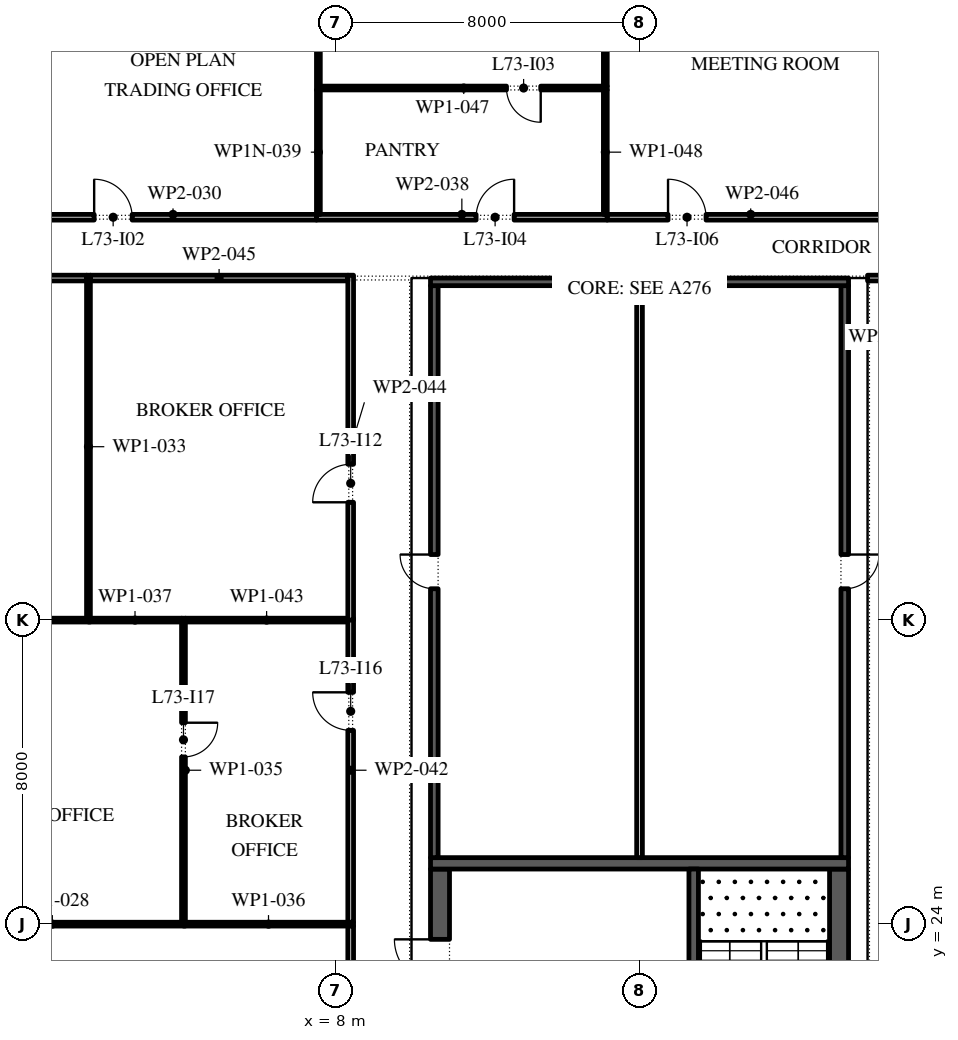
"""IFC4 building model, lengths in metres.
Left out: names, types, materials, properties, quantities, classifications, styles, units other than length and angle.
Written with IfcOpenShell. Run it as: python <this file> out.ifc"""

import sys

from ifc_helpers import new_model, si_unit, direction, frame, frame_2d, origin, place, context, subcontext, project, spatial, rectangle, extrude, element, fill, save


model = new_model("IFC4")
c1 = context("Model", 3, precision=1e-05, world=origin(), true_north=direction((0.0, 1.0)))
c2 = subcontext(c1, "Body", "Model", "MODEL_VIEW")
j1 = project(units=[si_unit("LENGTHUNIT", "METRE"), si_unit("PLANEANGLEUNIT", "RADIAN")], contexts=[c1])
p1 = place(None, origin())
s1 = spatial("IfcSite", under=j1, at=p1, CompositionType="ELEMENT")
p2 = place(p1, origin())
s2 = spatial("IfcBuilding", under=s1, at=p2, CompositionType="ELEMENT")
p3 = place(p2, frame((0.0, 0.0, 334.2)))
s3 = spatial("IfcBuildingStorey", under=s2, at=p3, CompositionType="ELEMENT", Elevation=334.2)
p4 = place(p3, frame((21.25, -2.45, 0.0), z_axis=(0.0, 0.0, 1.0), x_axis=(0.0, 1.0, 0.0)))
e1 = element("IfcWall", 1, at=p4, inside=s3, PredefinedType="SHEAR", context=c2, shape_type="SweptSolid", body=[
    extrude(rectangle(XDim=27.9, YDim=0.5, at=frame_2d((13.95, 0.0))), origin(), (0.0, 0.0, 1.0), 4.0),
])
p5 = place(p4, frame((5.05, 0.0, 0.0)))
e2 = element("IfcOpeningElement", 2, at=p5, cuts=e1, PredefinedType="OPENING", context=c2, shape_type="SweptSolid", body=[
    extrude(rectangle(XDim=1.2, YDim=2.1, at=frame_2d((0.6, 1.05))), frame((0.0, 0.26, 0.0), z_axis=(0.0, -1.0, 0.0), x_axis=(1.0, 0.0, 0.0)), (0.0, 0.0, 1.0), 0.52),
])
p6 = place(p4, frame((21.65, 0.0, 0.0)))
e3 = element("IfcOpeningElement", 3, at=p6, cuts=e1, PredefinedType="OPENING", context=c2, shape_type="SweptSolid", body=[
    extrude(rectangle(XDim=1.2, YDim=2.1, at=frame_2d((0.6, 1.05))), frame((0.0, 0.26, 0.0), z_axis=(0.0, -1.0, 0.0), x_axis=(1.0, 0.0, 0.0)), (0.0, 0.0, 1.0), 0.52),
])
p7 = place(p3, frame((10.75, -2.45, 0.0), z_axis=(0.0, 0.0, 1.0), x_axis=(0.0, 1.0, 0.0)))
e4 = element("IfcWall", 4, at=p7, inside=s3, PredefinedType="SHEAR", context=c2, shape_type="SweptSolid", body=[
    extrude(rectangle(XDim=27.9, YDim=0.5, at=frame_2d((13.95, 0.0))), origin(), (0.0, 0.0, 1.0), 4.0),
])
p8 = place(p7, frame((23.65, 0.0, 0.0)))
e5 = element("IfcOpeningElement", 5, at=p8, cuts=e4, PredefinedType="OPENING", context=c2, shape_type="SweptSolid", body=[
    extrude(rectangle(XDim=2.4, YDim=2.1, at=frame_2d((1.2, 1.05))), frame((0.0, 0.26, 0.0), z_axis=(0.0, -1.0, 0.0), x_axis=(1.0, 0.0, 0.0)), (0.0, 0.0, 1.0), 0.52),
])
p9 = place(p7, frame((1.387, 0.0, 0.0)))
e6 = element("IfcOpeningElement", 6, at=p9, cuts=e4, PredefinedType="OPENING", context=c2, shape_type="SweptSolid", body=[
    extrude(rectangle(XDim=0.9, YDim=2.1, at=frame_2d((0.45, 1.05))), frame((0.0, 0.26, 0.0), z_axis=(0.0, -1.0, 0.0), x_axis=(1.0, 0.0, 0.0)), (0.0, 0.0, 1.0), 0.52),
])
p10 = place(p7, frame((4.562, 0.0, 0.0)))
e7 = element("IfcOpeningElement", 7, at=p10, cuts=e4, PredefinedType="OPENING", context=c2, shape_type="SweptSolid", body=[
    extrude(rectangle(XDim=1.0, YDim=2.1, at=frame_2d((0.5, 1.05))), frame((0.0, 0.26, 0.0), z_axis=(0.0, -1.0, 0.0), x_axis=(1.0, 0.0, 0.0)), (0.0, 0.0, 1.0), 0.52),
])
p11 = place(p3, frame((10.5, 25.6, 0.0), z_axis=(0.0, 0.0, 1.0), x_axis=(1.0, 0.0, 0.0)))
e8 = element("IfcWall", 8, at=p11, inside=s3, PredefinedType="SHEAR", context=c2, shape_type="SweptSolid", body=[
    extrude(rectangle(XDim=11.0, YDim=0.3, at=frame_2d((5.5, 0.0))), origin(), (0.0, 0.0, 1.0), 4.0),
])
p12 = place(p3, frame((17.425, 19.15, 0.0), z_axis=(0.0, 0.0, 1.0), x_axis=(0.0, 1.0, 0.0)))
e9 = element("IfcWall", 9, at=p12, inside=s3, PredefinedType="SHEAR", context=c2, shape_type="SweptSolid", body=[
    extrude(rectangle(XDim=6.3, YDim=0.25, at=frame_2d((3.15, 0.0))), origin(), (0.0, 0.0, 1.0), 4.0),
])
p13 = place(p12, frame((0.05, 0.0, 0.0)))
e10 = element("IfcOpeningElement", 10, at=p13, cuts=e9, PredefinedType="OPENING", context=c2, shape_type="SweptSolid", body=[
    extrude(rectangle(XDim=1.2, YDim=2.1, at=frame_2d((0.6, 1.05))), frame((0.0, 0.135, 0.0), z_axis=(0.0, -1.0, 0.0), x_axis=(1.0, 0.0, 0.0)), (0.0, 0.0, 1.0), 0.27),
])
p14 = place(p3, frame((21.4, 25.75, 0.0), z_axis=(0.0, 0.0, 1.0), x_axis=(0.0, 1.0, 0.0)))
e11 = element("IfcWall", 11, at=p14, inside=s3, PredefinedType="SHEAR", context=c2, shape_type="SweptSolid", body=[
    extrude(rectangle(XDim=15.05, YDim=0.2, at=frame_2d((7.525, 0.0))), origin(), (0.0, 0.0, 1.0), 4.0),
])
p15 = place(p14, frame((7.075, 0.0, 0.0)))
e12 = element("IfcOpeningElement", 12, at=p15, cuts=e11, PredefinedType="OPENING", context=c2, shape_type="SweptSolid", body=[
    extrude(rectangle(XDim=0.9, YDim=2.1, at=frame_2d((0.45, 1.05))), frame((0.0, 0.11, 0.0), z_axis=(0.0, -1.0, 0.0), x_axis=(1.0, 0.0, 0.0)), (0.0, 0.0, 1.0), 0.22),
])
p16 = place(p3, frame((10.6, 25.75, 0.0), z_axis=(0.0, 0.0, 1.0), x_axis=(0.0, 1.0, 0.0)))
e13 = element("IfcWall", 13, at=p16, inside=s3, PredefinedType="SHEAR", context=c2, shape_type="SweptSolid", body=[
    extrude(rectangle(XDim=15.05, YDim=0.2, at=frame_2d((7.525, 0.0))), origin(), (0.0, 0.0, 1.0), 4.0),
])
p17 = place(p16, frame((7.075, 0.0, 0.0)))
e14 = element("IfcOpeningElement", 14, at=p17, cuts=e13, PredefinedType="OPENING", context=c2, shape_type="SweptSolid", body=[
    extrude(rectangle(XDim=0.9, YDim=2.1, at=frame_2d((0.45, 1.05))), frame((0.0, 0.11, 0.0), z_axis=(0.0, -1.0, 0.0), x_axis=(1.0, 0.0, 0.0)), (0.0, 0.0, 1.0), 0.22),
])
p18 = place(p3, frame((10.5, 40.9, 0.0), z_axis=(0.0, 0.0, 1.0), x_axis=(1.0, 0.0, 0.0)))
e15 = element("IfcWall", 15, at=p18, inside=s3, PredefinedType="SHEAR", context=c2, shape_type="SweptSolid", body=[
    extrude(rectangle(XDim=11.0, YDim=0.2, at=frame_2d((5.5, 0.0))), origin(), (0.0, 0.0, 1.0), 4.0),
])
p19 = place(p3, frame((16.0, 25.75, 0.0), z_axis=(0.0, 0.0, 1.0), x_axis=(0.0, 1.0, 0.0)))
e16 = element("IfcWall", 16, at=p19, inside=s3, PredefinedType="PARTITIONING", context=c2, shape_type="SweptSolid", body=[
    extrude(rectangle(XDim=15.05, YDim=0.15, at=frame_2d((7.525, 0.0))), origin(), (0.0, 0.0, 1.0), 4.0),
])
p20 = place(p3, frame((-2.95, 24.0, 0.0), z_axis=(0.0, 0.0, 1.0), x_axis=(1.0, 0.0, 0.0)))
e17 = element("IfcWall", 17, at=p20, inside=s3, PredefinedType="PARTITIONING", context=c2, shape_type="SweptSolid", body=[
    extrude(rectangle(XDim=7.0, YDim=0.1, at=frame_2d((3.5, 0.0))), origin(), (0.0, 0.0, 1.0), 4.0),
])
p21 = place(p3, frame((-0.05, 42.6, 0.0), z_axis=(0.0, 0.0, 1.0), x_axis=(1.0, 0.0, 0.0)))
e18 = element("IfcWall", 18, at=p21, inside=s3, PredefinedType="PARTITIONING", context=c2, shape_type="SweptSolid", body=[
    extrude(rectangle(XDim=7.55, YDim=0.15, at=frame_2d((3.775, 0.0))), origin(), (0.0, 0.0, 1.0), 4.0),
])
p22 = place(p21, frame((1.7, 0.0, 0.0)))
e19 = element("IfcOpeningElement", 19, at=p22, cuts=e18, PredefinedType="OPENING", context=c2, shape_type="SweptSolid", body=[
    extrude(rectangle(XDim=1.0, YDim=2.1, at=frame_2d((0.5, 1.05))), frame((0.0, 0.085, 0.0), z_axis=(0.0, -1.0, 0.0), x_axis=(1.0, 0.0, 0.0)), (0.0, 0.0, 1.0), 0.17),
])
p23 = place(p3, frame((1.55, 32.0, 0.0), z_axis=(0.0, 0.0, 1.0), x_axis=(-1.0, 0.0, 0.0)))
e20 = element("IfcWall", 20, at=p23, inside=s3, PredefinedType="PARTITIONING", context=c2, shape_type="SweptSolid", body=[
    extrude(rectangle(XDim=4.5, YDim=0.1, at=frame_2d((2.25, 0.0))), origin(), (0.0, 0.0, 1.0), 4.0),
])
p24 = place(p3, frame((1.5, 32.05, 0.0), z_axis=(0.0, 0.0, 1.0), x_axis=(0.0, 1.0, 0.0)))
e21 = element("IfcWall", 21, at=p24, inside=s3, PredefinedType="PARTITIONING", context=c2, shape_type="SweptSolid", body=[
    extrude(rectangle(XDim=9.025, YDim=0.1, at=frame_2d((4.512, 0.0))), origin(), (0.0, 0.0, 1.0), 4.0),
])
p25 = place(p3, frame((1.45, 41.0, 0.0), z_axis=(0.0, 0.0, 1.0), x_axis=(-1.0, 0.0, 0.0)))
e22 = element("IfcWall", 22, at=p25, inside=s3, PredefinedType="PARTITIONING", context=c2, shape_type="SweptSolid", body=[
    extrude(rectangle(XDim=5.9, YDim=0.15, at=frame_2d((2.95, 0.0))), origin(), (0.0, 0.0, 1.0), 4.0),
])
p26 = place(p25, frame((1.3, 0.0, 0.0)))
e23 = element("IfcOpeningElement", 23, at=p26, cuts=e22, PredefinedType="OPENING", context=c2, shape_type="SweptSolid", body=[
    extrude(rectangle(XDim=1.0, YDim=2.1, at=frame_2d((0.5, 1.05))), frame((0.0, 0.085, 0.0), z_axis=(0.0, -1.0, 0.0), x_axis=(1.0, 0.0, 0.0)), (0.0, 0.0, 1.0), 0.17),
])
p27 = place(p3, frame((4.0, 24.05, 0.0), z_axis=(0.0, 0.0, 1.0), x_axis=(0.0, 1.0, 0.0)))
e24 = element("IfcWall", 24, at=p27, inside=s3, PredefinedType="PARTITIONING", context=c2, shape_type="SweptSolid", body=[
    extrude(rectangle(XDim=8.0, YDim=0.1, at=frame_2d((4.0, 0.0))), origin(), (0.0, 0.0, 1.0), 4.0),
])
p28 = place(p27, frame((4.35, 0.0, 0.0)))
e25 = element("IfcOpeningElement", 25, at=p28, cuts=e24, PredefinedType="OPENING", context=c2, shape_type="SweptSolid", body=[
    extrude(rectangle(XDim=0.9, YDim=2.1, at=frame_2d((0.45, 1.05))), frame((0.0, 0.06, 0.0), z_axis=(0.0, -1.0, 0.0), x_axis=(1.0, 0.0, 0.0)), (0.0, 0.0, 1.0), 0.12),
])
p29 = place(p3, frame((4.0, 24.0, 0.0), z_axis=(0.0, 0.0, 1.0), x_axis=(1.0, 0.0, 0.0)))
e26 = element("IfcWall", 26, at=p29, inside=s3, PredefinedType="PARTITIONING", context=c2, shape_type="SweptSolid", body=[
    extrude(rectangle(XDim=4.475, YDim=0.1, at=frame_2d((2.238, 0.0))), origin(), (0.0, 0.0, 1.0), 4.0),
])
p30 = place(p3, frame((3.95, 32.0, 0.0), z_axis=(0.0, 0.0, 1.0), x_axis=(-1.0, 0.0, 0.0)))
e27 = element("IfcWall", 27, at=p30, inside=s3, PredefinedType="PARTITIONING", context=c2, shape_type="SweptSolid", body=[
    extrude(rectangle(XDim=2.45, YDim=0.1, at=frame_2d((1.225, 0.0))), origin(), (0.0, 0.0, 1.0), 4.0),
])
p31 = place(p3, frame((7.5, 42.6, 0.0), z_axis=(0.0, 0.0, 1.0), x_axis=(1.0, 0.0, 0.0)))
e28 = element("IfcWall", 28, at=p31, inside=s3, PredefinedType="PARTITIONING", context=c2, shape_type="SweptSolid", body=[
    extrude(rectangle(XDim=7.65, YDim=0.15, at=frame_2d((3.825, 0.0))), origin(), (0.0, 0.0, 1.0), 4.0),
])
p32 = place(p31, frame((4.2, 0.0, 0.0)))
e29 = element("IfcOpeningElement", 29, at=p32, cuts=e28, PredefinedType="OPENING", context=c2, shape_type="SweptSolid", body=[
    extrude(rectangle(XDim=1.0, YDim=2.1, at=frame_2d((0.5, 1.05))), frame((0.0, 0.085, 0.0), z_axis=(0.0, -1.0, 0.0), x_axis=(1.0, 0.0, 0.0)), (0.0, 0.0, 1.0), 0.17),
])
p33 = place(p3, frame((7.55, 45.95, 0.0), z_axis=(0.0, 0.0, 1.0), x_axis=(0.0, -1.0, 0.0)))
e30 = element("IfcWall", 30, at=p33, inside=s3, PredefinedType="PARTITIONING", context=c2, shape_type="SweptSolid", body=[
    extrude(rectangle(XDim=3.275, YDim=0.1, at=frame_2d((1.637, 0.0))), origin(), (0.0, 0.0, 1.0), 3.164),
])
p34 = place(p3, frame((7.55, 52.8, 0.0), z_axis=(0.0, 0.0, 1.0), x_axis=(0.0, -1.0, 0.0)))
e31 = element("IfcWall", 31, at=p34, inside=s3, PredefinedType="PARTITIONING", context=c2, shape_type="SweptSolid", body=[
    extrude(rectangle(XDim=6.85, YDim=0.1, at=frame_2d((3.425, 0.0))), origin(), (0.0, 0.0, 1.0), 3.164),
])
p35 = place(p3, frame((8.4, 19.075, 0.0), z_axis=(0.0, 0.0, 1.0), x_axis=(0.0, 1.0, 0.0)))
e32 = element("IfcWall", 32, at=p35, inside=s3, PredefinedType="PARTITIONING", context=c2, shape_type="SweptSolid", body=[
    extrude(rectangle(XDim=4.875, YDim=0.15, at=frame_2d((2.438, 0.0))), origin(), (0.0, 0.0, 1.0), 4.0),
])
p36 = place(p3, frame((8.4, 24.05, 0.0), z_axis=(0.0, 0.0, 1.0), x_axis=(0.0, 1.0, 0.0)))
e33 = element("IfcWall", 33, at=p36, inside=s3, PredefinedType="PARTITIONING", context=c2, shape_type="SweptSolid", body=[
    extrude(rectangle(XDim=8.0, YDim=0.15, at=frame_2d((4.0, 0.0))), origin(), (0.0, 0.0, 1.0), 4.0),
])
p37 = place(p36, frame((5.05, 0.0, 0.0)))
e34 = element("IfcOpeningElement", 34, at=p37, cuts=e33, PredefinedType="OPENING", context=c2, shape_type="SweptSolid", body=[
    extrude(rectangle(XDim=1.0, YDim=2.1, at=frame_2d((0.5, 1.05))), frame((0.0, 0.085, 0.0), z_axis=(0.0, -1.0, 0.0), x_axis=(1.0, 0.0, 0.0)), (0.0, 0.0, 1.0), 0.17),
])
p38 = place(p3, frame((8.325, 32.0, 0.0), z_axis=(0.0, 0.0, 1.0), x_axis=(-1.0, 0.0, 0.0)))
e35 = element("IfcWall", 35, at=p38, inside=s3, PredefinedType="PARTITIONING", context=c2, shape_type="SweptSolid", body=[
    extrude(rectangle(XDim=4.275, YDim=0.1, at=frame_2d((2.137, 0.0))), origin(), (0.0, 0.0, 1.0), 4.0),
])
p39 = place(p3, frame((8.4, 32.0, 0.0), z_axis=(0.0, 0.0, 1.0), x_axis=(0.0, 1.0, 0.0)))
e36 = element("IfcWall", 36, at=p39, inside=s3, PredefinedType="PARTITIONING", context=c2, shape_type="SweptSolid", body=[
    extrude(rectangle(XDim=9.075, YDim=0.15, at=frame_2d((4.538, 0.0))), origin(), (0.0, 0.0, 1.0), 4.0),
])
p40 = place(p39, frame((3.1, 0.0, 0.0)))
e37 = element("IfcOpeningElement", 37, at=p40, cuts=e36, PredefinedType="OPENING", context=c2, shape_type="SweptSolid", body=[
    extrude(rectangle(XDim=1.0, YDim=2.1, at=frame_2d((0.5, 1.05))), frame((0.0, 0.085, 0.0), z_axis=(0.0, -1.0, 0.0), x_axis=(1.0, 0.0, 0.0)), (0.0, 0.0, 1.0), 0.17),
])
p41 = place(p3, frame((8.325, 41.0, 0.0), z_axis=(0.0, 0.0, 1.0), x_axis=(-1.0, 0.0, 0.0)))
e38 = element("IfcWall", 38, at=p41, inside=s3, PredefinedType="PARTITIONING", context=c2, shape_type="SweptSolid", body=[
    extrude(rectangle(XDim=6.775, YDim=0.15, at=frame_2d((3.387, 0.0))), origin(), (0.0, 0.0, 1.0), 4.0),
])
p42 = place(p3, frame((15.15, 42.6, 0.0), z_axis=(0.0, 0.0, 1.0), x_axis=(1.0, 0.0, 0.0)))
e39 = element("IfcWall", 39, at=p42, inside=s3, PredefinedType="PARTITIONING", context=c2, shape_type="SweptSolid", body=[
    extrude(rectangle(XDim=7.55, YDim=0.15, at=frame_2d((3.775, 0.0))), origin(), (0.0, 0.0, 1.0), 4.0),
])
p43 = place(p42, frame((1.6, 0.0, 0.0)))
e40 = element("IfcOpeningElement", 40, at=p43, cuts=e39, PredefinedType="OPENING", context=c2, shape_type="SweptSolid", body=[
    extrude(rectangle(XDim=1.0, YDim=2.1, at=frame_2d((0.5, 1.05))), frame((0.0, 0.085, 0.0), z_axis=(0.0, -1.0, 0.0), x_axis=(1.0, 0.0, 0.0)), (0.0, 0.0, 1.0), 0.17),
])
p44 = place(p3, frame((15.15, 46.0, 0.0), z_axis=(0.0, 0.0, 1.0), x_axis=(-1.0, 0.0, 0.0)))
e41 = element("IfcWall", 41, at=p44, inside=s3, PredefinedType="PARTITIONING", context=c2, shape_type="SweptSolid", body=[
    extrude(rectangle(XDim=7.55, YDim=0.1, at=frame_2d((3.775, 0.0))), origin(), (0.0, 0.0, 1.0), 4.0),
])
p45 = place(p44, frame((1.75, 0.0, 0.0)))
e42 = element("IfcOpeningElement", 42, at=p45, cuts=e41, PredefinedType="OPENING", context=c2, shape_type="SweptSolid", body=[
    extrude(rectangle(XDim=0.9, YDim=2.1, at=frame_2d((0.45, 1.05))), frame((0.0, 0.06, 0.0), z_axis=(0.0, -1.0, 0.0), x_axis=(1.0, 0.0, 0.0)), (0.0, 0.0, 1.0), 0.12),
])
p46 = place(p3, frame((15.1, 45.95, 0.0), z_axis=(0.0, 0.0, 1.0), x_axis=(0.0, -1.0, 0.0)))
e43 = element("IfcWall", 43, at=p46, inside=s3, PredefinedType="PARTITIONING", context=c2, shape_type="SweptSolid", body=[
    extrude(rectangle(XDim=3.275, YDim=0.1, at=frame_2d((1.637, 0.0))), origin(), (0.0, 0.0, 1.0), 4.0),
])
p47 = place(p3, frame((15.1, 52.8, 0.0), z_axis=(0.0, 0.0, 1.0), x_axis=(0.0, -1.0, 0.0)))
e44 = element("IfcWall", 44, at=p47, inside=s3, PredefinedType="PARTITIONING", context=c2, shape_type="SweptSolid", body=[
    extrude(rectangle(XDim=6.75, YDim=0.1, at=frame_2d((3.375, 0.0))), origin(), (0.0, 0.0, 1.0), 4.0),
])
p48 = place(p3, frame((26.05, 41.0, 0.0), z_axis=(0.0, 0.0, 1.0), x_axis=(-1.0, 0.0, 0.0)))
e45 = element("IfcWall", 45, at=p48, inside=s3, PredefinedType="PARTITIONING", context=c2, shape_type="SweptSolid", body=[
    extrude(rectangle(XDim=4.05, YDim=0.15, at=frame_2d((2.025, 0.0))), origin(), (0.0, 0.0, 1.0), 4.0),
])
p49 = place(p48, frame((0.65, 0.0, 0.0)))
e46 = element("IfcOpeningElement", 46, at=p49, cuts=e45, PredefinedType="OPENING", context=c2, shape_type="SweptSolid", body=[
    extrude(rectangle(XDim=1.0, YDim=2.1, at=frame_2d((0.5, 1.05))), frame((0.0, 0.085, 0.0), z_axis=(0.0, -1.0, 0.0), x_axis=(1.0, 0.0, 0.0)), (0.0, 0.0, 1.0), 0.17),
])
p50 = place(p8, origin())
e47 = element("IfcDoor", 47, at=p50, inside=s3, OperationType="DOUBLE_DOOR_SINGLE_SWING", PredefinedType="DOOR", context=c2, shape_type="SweptSolid", body=[
    extrude(rectangle(XDim=2.4, YDim=2.1, at=frame_2d((1.2, 1.05))), frame((0.0, 0.025, 0.0), z_axis=(0.0, -1.0, 0.0), x_axis=(1.0, 0.0, 0.0)), (0.0, 0.0, 1.0), 0.05),
])
fill(e5, e47)
p51 = place(p15, frame((0.9, 0.15, 0.0), z_axis=(0.0, 0.0, 1.0), x_axis=(-1.0, 0.0, 0.0)))
e48 = element("IfcDoor", 48, at=p51, inside=s3, OperationType="SINGLE_SWING_RIGHT", PredefinedType="DOOR", context=c2, shape_type="SweptSolid", body=[
    extrude(rectangle(XDim=0.9, YDim=2.1, at=frame_2d((0.45, 1.05))), frame((0.0, 0.1, 0.0), z_axis=(0.0, -1.0, 0.0), x_axis=(1.0, 0.0, 0.0)), (0.0, 0.0, 1.0), 0.05),
])
fill(e12, e48)
p52 = place(p17, origin())
e49 = element("IfcDoor", 49, at=p52, inside=s3, OperationType="SINGLE_SWING_LEFT", PredefinedType="DOOR", context=c2, shape_type="SweptSolid", body=[
    extrude(rectangle(XDim=0.9, YDim=2.1, at=frame_2d((0.45, 1.05))), frame((0.0, -0.05, 0.0), z_axis=(0.0, -1.0, 0.0), x_axis=(1.0, 0.0, 0.0)), (0.0, 0.0, 1.0), 0.05),
])
fill(e14, e49)
p53 = place(p22, origin())
e50 = element("IfcDoor", 50, at=p53, inside=s3, OperationType="SINGLE_SWING_RIGHT", PredefinedType="DOOR", context=c2, shape_type="SweptSolid", body=[
    extrude(rectangle(XDim=1.0, YDim=2.1, at=frame_2d((0.5, 1.05))), frame((0.0, 0.025, 0.0), z_axis=(0.0, -1.0, 0.0), x_axis=(1.0, 0.0, 0.0)), (0.0, 0.0, 1.0), 0.05),
])
fill(e19, e50)
p54 = place(p45, origin())
e51 = element("IfcDoor", 51, at=p54, inside=s3, OperationType="SINGLE_SWING_RIGHT", PredefinedType="DOOR", context=c2, shape_type="SweptSolid", body=[
    extrude(rectangle(XDim=0.9, YDim=2.1, at=frame_2d((0.45, 1.05))), frame((0.0, 0.025, 0.0), z_axis=(0.0, -1.0, 0.0), x_axis=(1.0, 0.0, 0.0)), (0.0, 0.0, 1.0), 0.05),
])
fill(e42, e51)
p55 = place(p32, origin())
e52 = element("IfcDoor", 52, at=p55, inside=s3, OperationType="SINGLE_SWING_LEFT", PredefinedType="DOOR", context=c2, shape_type="SweptSolid", body=[
    extrude(rectangle(XDim=1.0, YDim=2.1, at=frame_2d((0.5, 1.05))), frame((0.0, 0.025, 0.0), z_axis=(0.0, -1.0, 0.0), x_axis=(1.0, 0.0, 0.0)), (0.0, 0.0, 1.0), 0.05),
])
fill(e29, e52)
p56 = place(p43, origin())
e53 = element("IfcDoor", 53, at=p56, inside=s3, OperationType="SINGLE_SWING_RIGHT", PredefinedType="DOOR", context=c2, shape_type="SweptSolid", body=[
    extrude(rectangle(XDim=1.0, YDim=2.1, at=frame_2d((0.5, 1.05))), frame((0.0, 0.025, 0.0), z_axis=(0.0, -1.0, 0.0), x_axis=(1.0, 0.0, 0.0)), (0.0, 0.0, 1.0), 0.05),
])
fill(e40, e53)
p57 = place(p40, origin())
e54 = element("IfcDoor", 54, at=p57, inside=s3, OperationType="SINGLE_SWING_RIGHT", PredefinedType="DOOR", context=c2, shape_type="SweptSolid", body=[
    extrude(rectangle(XDim=1.0, YDim=2.1, at=frame_2d((0.5, 1.05))), frame((0.0, 0.025, 0.0), z_axis=(0.0, -1.0, 0.0), x_axis=(1.0, 0.0, 0.0)), (0.0, 0.0, 1.0), 0.05),
])
fill(e37, e54)
p58 = place(p37, origin())
e55 = element("IfcDoor", 55, at=p58, inside=s3, OperationType="SINGLE_SWING_LEFT", PredefinedType="DOOR", context=c2, shape_type="SweptSolid", body=[
    extrude(rectangle(XDim=1.0, YDim=2.1, at=frame_2d((0.5, 1.05))), frame((0.0, 0.025, 0.0), z_axis=(0.0, -1.0, 0.0), x_axis=(1.0, 0.0, 0.0)), (0.0, 0.0, 1.0), 0.05),
])
fill(e34, e55)
p59 = place(p28, frame((0.9, 0.0, 0.0), z_axis=(0.0, 0.0, 1.0), x_axis=(-1.0, 0.0, 0.0)))
e56 = element("IfcDoor", 56, at=p59, inside=s3, OperationType="SINGLE_SWING_RIGHT", PredefinedType="DOOR", context=c2, shape_type="SweptSolid", body=[
    extrude(rectangle(XDim=0.9, YDim=2.1, at=frame_2d((0.45, 1.05))), frame((0.0, 0.025, 0.0), z_axis=(0.0, -1.0, 0.0), x_axis=(1.0, 0.0, 0.0)), (0.0, 0.0, 1.0), 0.05),
])
fill(e25, e56)
save(model, sys.argv[1])
